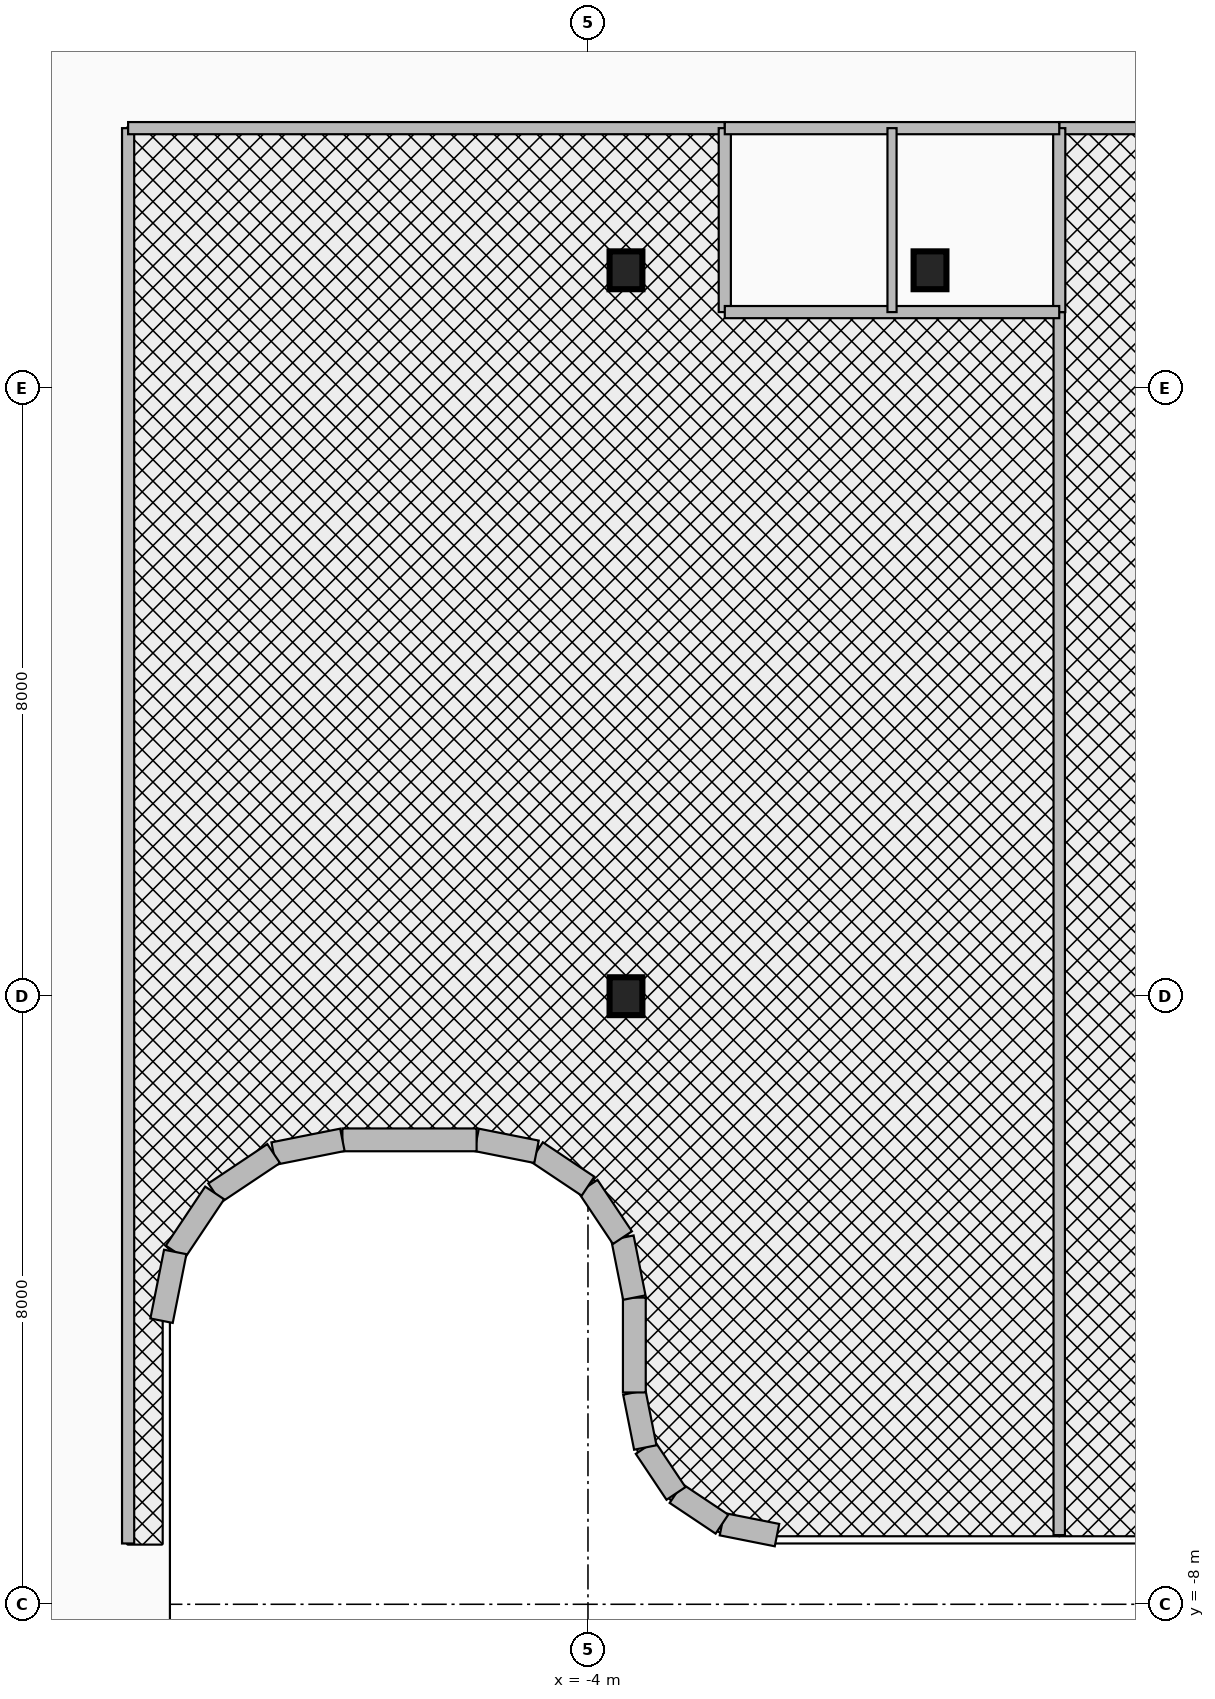
"""IFC4 building model, lengths in metres.
Left out: names, types, materials, properties, quantities, classifications, styles, units other than length and angle.
Written with IfcOpenShell. Run it as: python <this file> out.ifc"""

import sys

from ifc_helpers import new_model, si_unit, direction, frame, frame_2d, origin, origin_2d, place, context, subcontext, project, spatial, rectangle, i_section, extrude, source, transform, mapped, element, fill, save


model = new_model("IFC4")
c1 = context("Model", 3, precision=1e-05, world=origin(), true_north=direction((0.0, 1.0)))
c2 = subcontext(c1, "Body", "Model", "MODEL_VIEW")
j1 = project(units=[si_unit("LENGTHUNIT", "METRE"), si_unit("PLANEANGLEUNIT", "RADIAN")], contexts=[c1])
p1 = place(None, origin())
s1 = spatial("IfcSite", under=j1, at=p1, CompositionType="ELEMENT")
p2 = place(p1, origin())
s2 = spatial("IfcBuilding", under=s1, at=p2, CompositionType="ELEMENT")
p3 = place(p2, frame((0.0, 0.0, 180.5)))
s3 = spatial("IfcBuildingStorey", under=s2, at=p3, CompositionType="ELEMENT", Elevation=180.5)
m1 = source(origin(), c2, "Body", "SweptSolid", [
    extrude(i_section(OverallWidth=0.432, OverallDepth=0.498, WebThickness=0.056, FlangeThickness=0.089, at=origin_2d()), origin(), (0.0, 0.0, 1.0), 3.95),
])
for number, where, z_axis, x_axis in (
    (1, (-3.5, 0.0, 0.0), (0.0, 0.0, 1.0), (1.0, 0.0, 0.0)),
    (2, (-3.5, 9.55, 0.0), (0.0, 0.0, 1.0), (1.0, 0.0, 0.0)),
    (3, (0.5, 9.55, 0.0), (0.0, 0.0, 1.0), (1.0, 0.0, 0.0)),
):
    element("IfcColumn", number, at=place(p3, frame(where, z_axis=z_axis, x_axis=x_axis)), inside=s3, PredefinedType="COLUMN", context=c2, shape_type="MappedRepresentation", body=[
        mapped(m1, transform((0.0, 0.0, 0.0), x_axis=(1.0, 0.0, 0.0), y_axis=(0.0, 1.0, 0.0), z_axis=(0.0, 0.0, 1.0), scale=1.0)),
    ])
p4 = place(p3, frame((-1.513, -7.09, 0.0), z_axis=(0.0, 0.0, 1.0), x_axis=(-0.980783640462, 0.195098566376, 0.0)))
e4 = element("IfcWall", 4, at=p4, inside=s3, PredefinedType="SOLIDWALL", context=c2, shape_type="SweptSolid", body=[
    extrude(rectangle(XDim=0.738, YDim=0.3, at=frame_2d((0.369, 0.0))), origin(), (0.0, 0.0, 1.0), 3.076),
])
p5 = place(p3, frame((-2.237, -6.946, 0.0), z_axis=(0.0, 0.0, 1.0), x_axis=(-0.831378135196, 0.555707113792, 0.0)))
e5 = element("IfcWall", 5, at=p5, inside=s3, PredefinedType="SOLIDWALL", context=c2, shape_type="SweptSolid", body=[
    extrude(rectangle(XDim=0.727, YDim=0.3, at=frame_2d((0.364, 0.0))), origin(), (0.0, 0.0, 1.0), 3.63),
])
p6 = place(p3, frame((-2.842, -6.542, 0.0), z_axis=(0.0, 0.0, 1.0), x_axis=(-0.555784030735, 0.83132671747, 0.0)))
e6 = element("IfcWall", 6, at=p6, inside=s3, PredefinedType="SOLIDWALL", context=c2, shape_type="SweptSolid", body=[
    extrude(rectangle(XDim=0.728, YDim=0.3, at=frame_2d((0.364, 0.0))), origin(), (0.0, 0.0, 1.0), 2.615),
])
p7 = place(p3, frame((-3.246, -5.937, 0.0), z_axis=(0.0, 0.0, 1.0), x_axis=(-0.194780446724, 0.980846867546, 0.0)))
e7 = element("IfcWall", 7, at=p7, inside=s3, PredefinedType="SOLIDWALL", context=c2, shape_type="SweptSolid", body=[
    extrude(rectangle(XDim=0.738, YDim=0.3, at=frame_2d((0.369, 0.0))), origin(), (0.0, 0.0, 1.0), 2.615),
])
p8 = place(p3, frame((-3.39, -5.213, 0.0), z_axis=(0.0, 0.0, 1.0), x_axis=(0.0, 1.0, 0.0)))
e8 = element("IfcWall", 8, at=p8, inside=s3, PredefinedType="SOLIDWALL", context=c2, shape_type="SweptSolid", body=[
    extrude(rectangle(XDim=1.248, YDim=0.3, at=frame_2d((0.624, 0.0))), origin(), (0.0, 0.0, 1.0), 2.615),
])
p9 = place(p3, frame((-3.39, -3.965, 0.0), z_axis=(0.0, 0.0, 1.0), x_axis=(-0.195356525272, 0.980732291726, 0.0)))
e9 = element("IfcWall", 9, at=p9, inside=s3, PredefinedType="SOLIDWALL", context=c2, shape_type="SweptSolid", body=[
    extrude(rectangle(XDim=0.803, YDim=0.3, at=frame_2d((0.402, 0.0))), origin(), (0.0, 0.0, 1.0), 2.615),
])
for number, where, z_axis, x_axis in (
    (10, (-3.547, -3.177, 0.0), (0.0, 0.0, 1.0), (-0.556, 0.831, 0.0)),
    (11, (-4.0, -2.5, 0.0), (0.0, 0.0, 1.0), (-0.831, 0.556, 0.0)),
):
    element("IfcWall", number, at=place(p3, frame(where, z_axis=z_axis, x_axis=x_axis)), inside=s3, PredefinedType="SOLIDWALL", context=c2, shape_type="SweptSolid", body=[
        extrude(rectangle(XDim=0.815, YDim=0.3, at=frame_2d((0.407, 0.0))), origin(), (0.0, 0.0, 1.0), 2.615),
    ])
p10 = place(p3, frame((-4.677, -2.047, 0.0), z_axis=(0.0, 0.0, 1.0), x_axis=(-0.980732291726, 0.195356525272, 0.0)))
e12 = element("IfcWall", 12, at=p10, inside=s3, PredefinedType="SOLIDWALL", context=c2, shape_type="SweptSolid", body=[
    extrude(rectangle(XDim=0.803, YDim=0.3, at=frame_2d((0.402, 0.0))), origin(), (0.0, 0.0, 1.0), 3.63),
])
p11 = place(p3, frame((-5.465, -1.89, 0.0), z_axis=(0.0, 0.0, 1.0), x_axis=(-1.0, 0.0, 0.0)))
e13 = element("IfcWall", 13, at=p11, inside=s3, PredefinedType="SOLIDWALL", context=c2, shape_type="SweptSolid", body=[
    extrude(rectangle(XDim=1.766, YDim=0.3, at=frame_2d((0.883, 0.0))), origin(), (0.0, 0.0, 1.0), 3.63),
])
p12 = place(p3, frame((-7.231, -1.89, 0.0), z_axis=(0.0, 0.0, 1.0), x_axis=(-0.980743190895, -0.195301801101, 0.0)))
e14 = element("IfcWall", 14, at=p12, inside=s3, PredefinedType="SOLIDWALL", context=c2, shape_type="SweptSolid", body=[
    extrude(rectangle(XDim=0.923, YDim=0.3, at=frame_2d((0.461, 0.0))), origin(), (0.0, 0.0, 1.0), 2.415),
])
p13 = place(p3, frame((-8.135, -2.07, 0.0), z_axis=(0.0, 0.0, 1.0), x_axis=(-0.831607331814, -0.555364065883, 0.0)))
e15 = element("IfcWall", 15, at=p13, inside=s3, PredefinedType="SOLIDWALL", context=c2, shape_type="SweptSolid", body=[
    extrude(rectangle(XDim=0.933, YDim=0.3, at=frame_2d((0.467, 0.0))), origin(), (0.0, 0.0, 1.0), 2.415),
])
p14 = place(p3, frame((-8.912, -2.588, 0.0), z_axis=(0.0, 0.0, 1.0), x_axis=(-0.555364065883, -0.831607331814, 0.0)))
e16 = element("IfcWall", 16, at=p14, inside=s3, PredefinedType="SOLIDWALL", context=c2, shape_type="SweptSolid", body=[
    extrude(rectangle(XDim=0.933, YDim=0.3, at=frame_2d((0.467, 0.0))), origin(), (0.0, 0.0, 1.0), 3.63),
])
p15 = place(p3, frame((-9.43, -3.365, 0.0), z_axis=(0.0, 0.0, 1.0), x_axis=(-0.195301801101, -0.980743190895, 0.0)))
e17 = element("IfcWall", 17, at=p15, inside=s3, PredefinedType="SOLIDWALL", context=c2, shape_type="SweptSolid", body=[
    extrude(rectangle(XDim=0.923, YDim=0.3, at=frame_2d((0.461, 0.0))), origin(), (0.0, 0.0, 1.0), 3.63),
])
p16 = place(p3, frame((-10.05, -7.2, 0.0), z_axis=(0.0, 0.0, 1.0), x_axis=(0.0, 1.0, 0.0)))
e18 = element("IfcWall", 18, at=p16, inside=s3, PredefinedType="PARTITIONING", context=c2, shape_type="SweptSolid", body=[
    extrude(rectangle(XDim=18.62, YDim=0.16, at=frame_2d((9.31, 0.0))), origin(), (0.0, 0.0, 1.0), 2.415),
])
p17 = place(p16, frame((12.0, 0.0, 0.0)))
e19 = element("IfcOpeningElement", 19, at=p17, cuts=e18, PredefinedType="OPENING", context=c2, shape_type="SweptSolid", body=[
    extrude(rectangle(XDim=1.8, YDim=2.15, at=frame_2d((0.9, 1.075))), frame((0.0, 0.095, 0.0), z_axis=(0.0, -1.0, 0.0), x_axis=(1.0, 0.0, 0.0)), (0.0, 0.0, 1.0), 0.19),
])
p18 = place(p3, frame((-10.05, 11.42, 0.0), z_axis=(0.0, 0.0, 1.0), x_axis=(1.0, 0.0, 0.0)))
e20 = element("IfcWall", 20, at=p18, inside=s3, PredefinedType="PARTITIONING", context=c2, shape_type="SweptSolid", body=[
    extrude(rectangle(XDim=7.85, YDim=0.16, at=frame_2d((3.925, 0.0))), origin(), (0.0, 0.0, 1.0), 2.615),
])
p19 = place(p3, frame((2.2, 11.42, 0.0), z_axis=(0.0, 0.0, 1.0), x_axis=(1.0, 0.0, 0.0)))
e21 = element("IfcWall", 21, at=p19, inside=s3, PredefinedType="PARTITIONING", context=c2, shape_type="SweptSolid", body=[
    extrude(rectangle(XDim=11.22, YDim=0.16, at=frame_2d((5.61, 0.0))), origin(), (0.0, 0.0, 1.0), 2.615),
])
p20 = place(p19, frame((4.0, 0.0, 0.0)))
e22 = element("IfcOpeningElement", 22, at=p20, cuts=e21, PredefinedType="OPENING", context=c2, shape_type="SweptSolid", body=[
    extrude(rectangle(XDim=1.8, YDim=2.15, at=frame_2d((0.9, 1.075))), frame((0.0, 0.095, 0.0), z_axis=(0.0, -1.0, 0.0), x_axis=(1.0, 0.0, 0.0)), (0.0, 0.0, 1.0), 0.19),
])
p21 = place(p3, frame((2.2, -7.09, 0.0), z_axis=(0.0, 0.0, 1.0), x_axis=(0.0, 1.0, 0.0)))
e23 = element("IfcWall", 23, at=p21, inside=s3, PredefinedType="PARTITIONING", context=c2, shape_type="SweptSolid", body=[
    extrude(rectangle(XDim=16.09, YDim=0.15, at=frame_2d((8.045, 0.0))), origin(), (0.0, 0.0, 1.0), 2.665),
])
p22 = place(p21, frame((11.5, 0.0, 0.0)))
e24 = element("IfcOpeningElement", 24, at=p22, cuts=e23, PredefinedType="OPENING", context=c2, shape_type="SweptSolid", body=[
    extrude(rectangle(XDim=0.9, YDim=2.1, at=frame_2d((0.45, 1.05))), frame((0.0, 0.09, 0.0), z_axis=(0.0, -1.0, 0.0), x_axis=(1.0, 0.0, 0.0)), (0.0, 0.0, 1.0), 0.18),
])
for number, where, z_axis, x_axis in (
    (25, (-2.2, 9.0, 0.0), (0.0, 0.0, 1.0), (0.0, 1.0, 0.0)),
    (26, (2.2, 9.0, 0.0), (0.0, 0.0, 1.0), (0.0, 1.0, 0.0)),
):
    element("IfcWall", number, at=place(p3, frame(where, z_axis=z_axis, x_axis=x_axis)), inside=s3, PredefinedType="PARTITIONING", context=c2, shape_type="SweptSolid", body=[
        extrude(rectangle(XDim=2.42, YDim=0.16, at=frame_2d((1.21, 0.0))), origin(), (0.0, 0.0, 1.0), 2.665),
    ])
p23 = place(p3, frame((-2.2, 9.0, 0.0), z_axis=(0.0, 0.0, 1.0), x_axis=(1.0, 0.0, 0.0)))
e27 = element("IfcWall", 27, at=p23, inside=s3, PredefinedType="PARTITIONING", context=c2, shape_type="SweptSolid", body=[
    extrude(rectangle(XDim=4.4, YDim=0.16, at=frame_2d((2.2, 0.0))), origin(), (0.0, 0.0, 1.0), 3.63),
])
p24 = place(p3, frame((-2.2, 11.42, 0.0), z_axis=(0.0, 0.0, 1.0), x_axis=(1.0, 0.0, 0.0)))
e28 = element("IfcWall", 28, at=p24, inside=s3, PredefinedType="PARTITIONING", context=c2, shape_type="SweptSolid", body=[
    extrude(rectangle(XDim=4.4, YDim=0.16, at=frame_2d((2.2, 0.0))), origin(), (0.0, 0.0, 1.0), 3.63),
])
p25 = place(p24, frame((0.3, 0.0, 0.0)))
e29 = element("IfcOpeningElement", 29, at=p25, cuts=e28, PredefinedType="OPENING", context=c2, shape_type="SweptSolid", body=[
    extrude(rectangle(XDim=0.85, YDim=2.1, at=frame_2d((0.425, 1.05))), frame((0.0, 0.095, 0.0), z_axis=(0.0, -1.0, 0.0), x_axis=(1.0, 0.0, 0.0)), (0.0, 0.0, 1.0), 0.19),
])
p26 = place(p24, frame((2.45, 0.0, 0.0)))
e30 = element("IfcOpeningElement", 30, at=p26, cuts=e28, PredefinedType="OPENING", context=c2, shape_type="SweptSolid", body=[
    extrude(rectangle(XDim=0.85, YDim=2.1, at=frame_2d((0.425, 1.05))), frame((0.0, 0.095, 0.0), z_axis=(0.0, -1.0, 0.0), x_axis=(1.0, 0.0, 0.0)), (0.0, 0.0, 1.0), 0.19),
])
p27 = place(p3, frame((0.0, 9.0, 0.0), z_axis=(0.0, 0.0, 1.0), x_axis=(0.0, 1.0, 0.0)))
e31 = element("IfcWall", 31, at=p27, inside=s3, PredefinedType="PARTITIONING", context=c2, shape_type="SweptSolid", body=[
    extrude(rectangle(XDim=2.42, YDim=0.12, at=frame_2d((1.21, 0.0))), origin(), (0.0, 0.0, 1.0), 2.665),
])
p28 = place(p17, frame((1.8, 0.0, 0.0), z_axis=(0.0, 0.0, 1.0), x_axis=(-1.0, 0.0, 0.0)))
e32 = element("IfcDoor", 32, at=p28, inside=s3, OperationType="DOUBLE_DOOR_SINGLE_SWING", PredefinedType="DOOR", context=c2, shape_type="SweptSolid", body=[
    extrude(rectangle(XDim=1.8, YDim=2.15, at=frame_2d((0.9, 1.075))), frame((0.0, 0.025, 0.0), z_axis=(0.0, -1.0, 0.0), x_axis=(1.0, 0.0, 0.0)), (0.0, 0.0, 1.0), 0.05),
])
fill(e19, e32)
p29 = place(p22, frame((0.9, 0.0, 0.0), z_axis=(0.0, 0.0, 1.0), x_axis=(-1.0, 0.0, 0.0)))
e33 = element("IfcDoor", 33, at=p29, inside=s3, OperationType="SINGLE_SWING_LEFT", PredefinedType="DOOR", context=c2, shape_type="SweptSolid", body=[
    extrude(rectangle(XDim=0.9, YDim=2.1, at=frame_2d((0.45, 1.05))), frame((0.0, 0.025, 0.0), z_axis=(0.0, -1.0, 0.0), x_axis=(1.0, 0.0, 0.0)), (0.0, 0.0, 1.0), 0.05),
])
fill(e24, e33)
p30 = place(p25, origin())
e34 = element("IfcDoor", 34, at=p30, inside=s3, OperationType="SINGLE_SWING_RIGHT", PredefinedType="DOOR", context=c2, shape_type="SweptSolid", body=[
    extrude(rectangle(XDim=0.85, YDim=2.1, at=frame_2d((0.425, 1.05))), frame((0.0, 0.025, 0.0), z_axis=(0.0, -1.0, 0.0), x_axis=(1.0, 0.0, 0.0)), (0.0, 0.0, 1.0), 0.05),
])
fill(e29, e34)
p31 = place(p26, origin())
e35 = element("IfcDoor", 35, at=p31, inside=s3, OperationType="SINGLE_SWING_LEFT", PredefinedType="DOOR", context=c2, shape_type="SweptSolid", body=[
    extrude(rectangle(XDim=0.85, YDim=2.1, at=frame_2d((0.425, 1.05))), frame((0.0, 0.025, 0.0), z_axis=(0.0, -1.0, 0.0), x_axis=(1.0, 0.0, 0.0)), (0.0, 0.0, 1.0), 0.05),
])
fill(e30, e35)
save(model, sys.argv[1])
